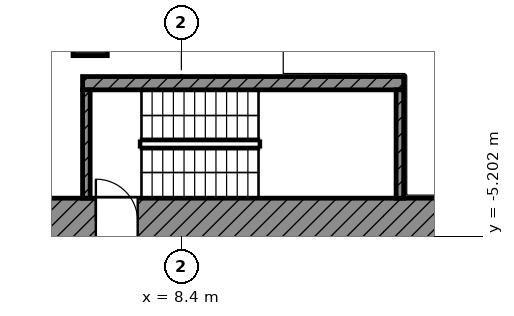
"""IFC4 building model, lengths in metres.
Left out: names, types, materials, properties, quantities, classifications, styles, units other than length and angle.
Written with IfcOpenShell. Run it as: python <this file> out.ifc"""

import sys

from ifc_helpers import new_model, si_unit, direction, frame, frame_2d, origin, origin_2d, place, context, subcontext, project, spatial, rectangle, extrude, element, fill, save


model = new_model("IFC4")
c1 = context("Model", 3, precision=1e-05, world=origin(), true_north=direction((0.0, 1.0)))
c2 = subcontext(c1, "Body", "Model", "MODEL_VIEW")
j1 = project(units=[si_unit("LENGTHUNIT", "METRE"), si_unit("PLANEANGLEUNIT", "RADIAN")], contexts=[c1])
p1 = place(None, origin())
s1 = spatial("IfcSite", under=j1, at=p1, CompositionType="ELEMENT")
p2 = place(p1, origin())
s2 = spatial("IfcBuilding", under=s1, at=p2, CompositionType="ELEMENT")
p3 = place(p2, frame((0.0, 0.0, 218.0)))
s3 = spatial("IfcBuildingStorey", under=s2, at=p3, CompositionType="ELEMENT", Elevation=218.0)
p4 = place(p3, frame((6.0, 0.0, 0.0), z_axis=(0.0, 0.0, 1.0), x_axis=(1.0, 0.0, 0.0)))
e1 = element("IfcColumn", 1, at=p4, inside=s3, PredefinedType="COLUMN", context=c2, shape_type="SweptSolid", body=[
    extrude(rectangle(XDim=0.9, YDim=0.9, at=origin_2d()), origin(), (0.0, 0.0, 1.0), 4.2),
])
p5 = place(p3, frame((4.2, -4.8, 0.0), z_axis=(0.0, 0.0, 1.0), x_axis=(1.0, 0.0, 0.0)))
e2 = element("IfcWall", 2, at=p5, inside=s3, PredefinedType="SHEAR", context=c2, shape_type="SweptSolid", body=[
    extrude(rectangle(XDim=20.6, YDim=1.2, at=frame_2d((10.3, 0.0))), origin(), (0.0, 0.0, 1.0), 3.6),
])
p6 = place(p5, frame((1.95, 0.0, 0.0)))
e3 = element("IfcOpeningElement", 3, at=p6, cuts=e2, PredefinedType="OPENING", context=c2, shape_type="SweptSolid", body=[
    extrude(rectangle(XDim=1.1, YDim=2.1, at=frame_2d((0.55, 1.05))), frame((0.0, 0.61, 0.0), z_axis=(0.0, -1.0, 0.0), x_axis=(1.0, 0.0, 0.0)), (0.0, 0.0, 1.0), 1.22),
])
p7 = place(p5, frame((17.95, 0.0, 0.0)))
e4 = element("IfcOpeningElement", 4, at=p7, cuts=e2, PredefinedType="OPENING", context=c2, shape_type="SweptSolid", body=[
    extrude(rectangle(XDim=1.1, YDim=2.1, at=frame_2d((0.55, 1.05))), frame((0.0, 0.61, 0.0), z_axis=(0.0, -1.0, 0.0), x_axis=(1.0, 0.0, 0.0)), (0.0, 0.0, 1.0), 1.22),
])
p8 = place(p3, frame((5.8, -1.175, 0.0), z_axis=(0.0, 0.0, 1.0), x_axis=(1.0, 0.0, 0.0)))
e5 = element("IfcWall", 5, at=p8, inside=s3, PredefinedType="SHEAR", context=c2, shape_type="SweptSolid", body=[
    extrude(rectangle(XDim=8.45, YDim=0.35, at=frame_2d((4.225, 0.0))), origin(), (0.0, 0.0, 1.0), 3.6),
])
for number, where, z_axis, x_axis in (
    (6, (5.9, -4.2, 0.0), (0.0, 0.0, 1.0), (0.0, 1.0, 0.0)),
    (7, (14.15, -4.2, 0.0), (0.0, 0.0, 1.0), (0.0, 1.0, 0.0)),
):
    element("IfcWall", number, at=place(p3, frame(where, z_axis=z_axis, x_axis=x_axis)), inside=s3, PredefinedType="SHEAR", context=c2, shape_type="SweptSolid", body=[
        extrude(rectangle(XDim=2.85, YDim=0.2, at=frame_2d((1.425, 0.0))), origin(), (0.0, 0.0, 1.0), 3.6),
    ])
p9 = place(p6, origin())
e8 = element("IfcDoor", 8, at=p9, inside=s3, OperationType="SINGLE_SWING_LEFT", PredefinedType="DOOR", context=c2, shape_type="SweptSolid", body=[
    extrude(rectangle(XDim=1.1, YDim=2.1, at=frame_2d((0.55, 1.05))), frame((0.0, 0.025, 0.0), z_axis=(0.0, -1.0, 0.0), x_axis=(1.0, 0.0, 0.0)), (0.0, 0.0, 1.0), 0.05),
])
fill(e3, e8)
save(model, sys.argv[1])
